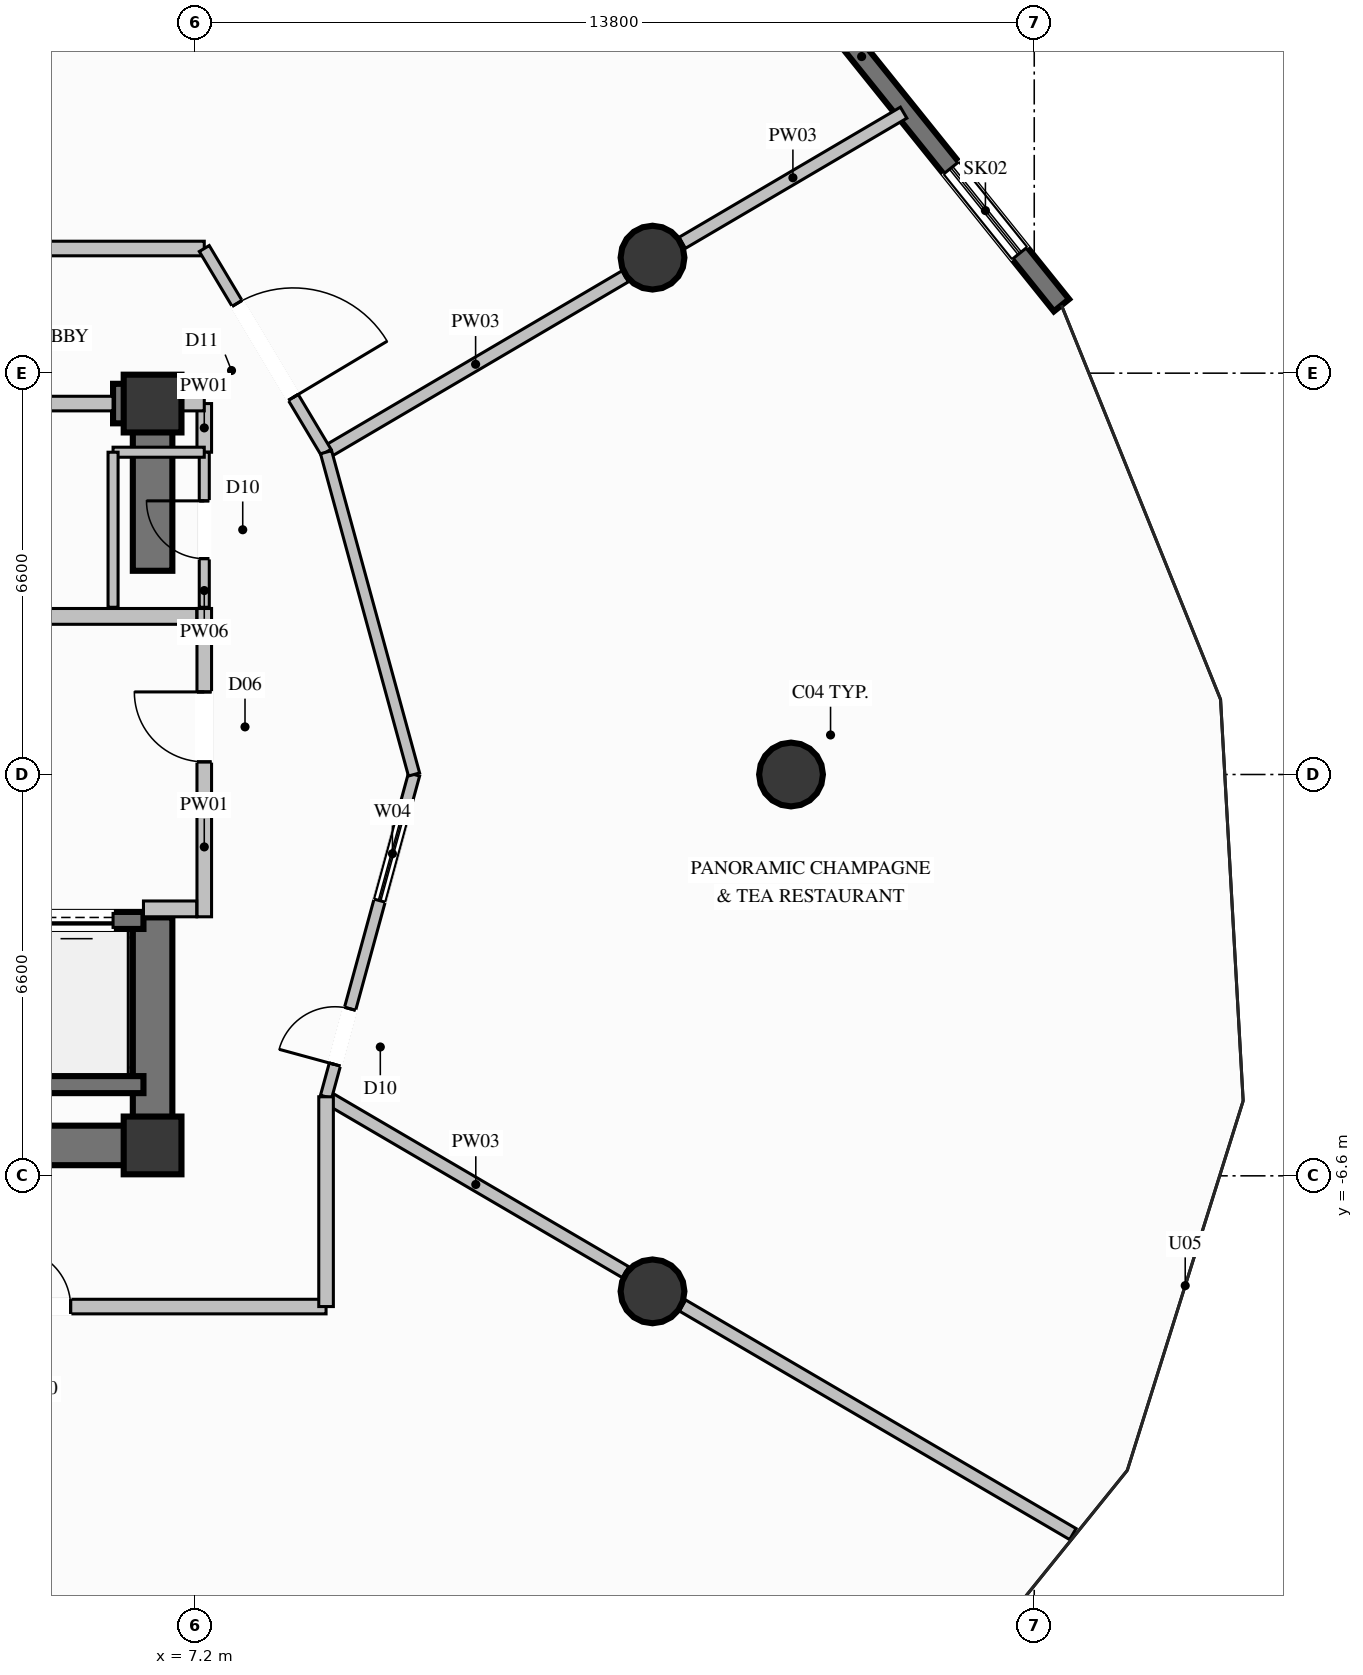
"""IFC4 building model, lengths in metres.
Left out: names, types, materials, properties, quantities, classifications, styles, units other than length and angle.
Written with IfcOpenShell. Run it as: python <this file> out.ifc"""

import sys

from ifc_helpers import new_model, si_unit, direction, frame, frame_2d, origin, origin_2d, place, context, subcontext, project, spatial, rectangle, circle, extrude, element, fill, save


model = new_model("IFC4")
c1 = context("Model", 3, precision=1e-05, world=origin(), true_north=direction((0.0, 1.0)))
c2 = subcontext(c1, "Body", "Model", "MODEL_VIEW")
j1 = project(units=[si_unit("LENGTHUNIT", "METRE"), si_unit("PLANEANGLEUNIT", "RADIAN")], contexts=[c1])
p1 = place(None, origin())
s1 = spatial("IfcSite", under=j1, at=p1, CompositionType="ELEMENT")
p2 = place(p1, origin())
s2 = spatial("IfcBuilding", under=s1, at=p2, CompositionType="ELEMENT")
p3 = place(p2, frame((0.0, 0.0, 98.0)))
s3 = spatial("IfcBuildingStorey", under=s2, at=p3, CompositionType="ELEMENT", Elevation=98.0)
for number, where, z_axis, x_axis in (
    (1, (6.5, -6.1, 0.0), (0.0, 0.0, 1.0), (1.0, 0.0, 0.0)),
    (2, (6.5, 6.1, 0.0), (0.0, 0.0, 1.0), (1.0, 0.0, 0.0)),
):
    element("IfcColumn", number, at=place(p3, frame(where, z_axis=z_axis, x_axis=x_axis)), inside=s3, PredefinedType="COLUMN", context=c2, shape_type="SweptSolid", body=[
        extrude(rectangle(XDim=0.95, YDim=0.95, at=origin_2d()), origin(), (0.0, 0.0, 1.0), 4.6),
    ])
p4 = place(p3, frame((4.15, -6.1, 0.0), z_axis=(0.0, 0.0, 1.0), x_axis=(1.0, 0.0, 0.0)))
e3 = element("IfcWall", 3, at=p4, inside=s3, PredefinedType="SHEAR", context=c2, shape_type="SweptSolid", body=[
    extrude(rectangle(XDim=2.025, YDim=0.65, at=frame_2d((1.013, 0.0))), origin(), (0.0, 0.0, 1.0), 4.6),
])
p5 = place(p3, frame((5.85, 6.1, 0.0), z_axis=(0.0, 0.0, 1.0), x_axis=(1.0, 0.0, 0.0)))
e4 = element("IfcWall", 4, at=p5, inside=s3, PredefinedType="SHEAR", context=c2, shape_type="SweptSolid", body=[
    extrude(rectangle(XDim=0.325, YDim=0.65, at=frame_2d((0.163, 0.0))), origin(), (0.0, 0.0, 1.0), 4.6),
])
p6 = place(p3, frame((6.5, -6.425, 0.0), z_axis=(0.0, 0.0, 1.0), x_axis=(0.0, 1.0, 0.0)))
e5 = element("IfcWall", 5, at=p6, inside=s3, PredefinedType="SHEAR", context=c2, shape_type="SweptSolid", body=[
    extrude(rectangle(XDim=4.075, YDim=0.65, at=frame_2d((2.038, 0.0))), origin(), (0.0, 0.0, 1.0), 4.6),
])
p7 = place(p3, frame((6.5, 3.35, 0.0), z_axis=(0.0, 0.0, 1.0), x_axis=(0.0, 1.0, 0.0)))
e6 = element("IfcWall", 6, at=p7, inside=s3, PredefinedType="SHEAR", context=c2, shape_type="SweptSolid", body=[
    extrude(rectangle(XDim=3.075, YDim=0.65, at=frame_2d((1.538, 0.0))), origin(), (0.0, 0.0, 1.0), 4.6),
])
for number, where, z_axis, x_axis in (
    (7, (17.0, 0.0, 0.0), (0.0, 0.0, 1.0), (1.0, 0.0, 0.0)),
    (8, (14.722, 8.5, 0.0), (0.0, 0.0, 1.0), (1.0, 0.0, 0.0)),
    (9, (14.722, -8.5, 0.0), (0.0, 0.0, 1.0), (1.0, 0.0, 0.0)),
):
    element("IfcColumn", number, at=place(p3, frame(where, z_axis=z_axis, x_axis=x_axis)), inside=s3, PredefinedType="COLUMN", context=c2, shape_type="SweptSolid", body=[
        extrude(circle(Radius=0.525, at=origin_2d()), origin(), (0.0, 0.0, 1.0), 4.6),
    ])
p8 = place(p3, frame((16.846, 13.443, 0.0), z_axis=(0.0, 0.0, 1.0), x_axis=(0.626452409109, -0.77945967126, 0.0)))
e10 = element("IfcWall", 10, at=p8, inside=s3, PredefinedType="SOLIDWALL", context=c2, shape_type="SweptSolid", body=[
    extrude(rectangle(XDim=7.346, YDim=0.32, at=frame_2d((3.673, 0.0))), origin(), (0.0, 0.0, 1.0), 4.35),
])
p9 = place(p8, frame((4.449, 0.0, 0.6)))
e11 = element("IfcOpeningElement", 11, at=p9, cuts=e10, PredefinedType="OPENING", context=c2, shape_type="SweptSolid", body=[
    extrude(rectangle(XDim=1.8, YDim=2.2, at=frame_2d((0.9, 1.1))), frame((0.0, 0.17, 0.0), z_axis=(0.0, -1.0, 0.0), x_axis=(1.0, 0.0, 0.0)), (0.0, 0.0, 1.0), 0.34),
])
p10 = place(p3, frame((4.15, -5.1, 0.0), z_axis=(0.0, 0.0, 1.0), x_axis=(1.0, 0.0, 0.0)))
e12 = element("IfcWall", 12, at=p10, inside=s3, PredefinedType="SOLIDWALL", context=c2, shape_type="SweptSolid", body=[
    extrude(rectangle(XDim=2.2, YDim=0.28, at=frame_2d((1.1, 0.0))), origin(), (0.0, 0.0, 1.0), 4.35),
])
p11 = place(p3, frame((6.35, -2.4, 0.0), z_axis=(0.0, 0.0, 1.0), x_axis=(-1.0, 0.0, 0.0)))
e13 = element("IfcWall", 13, at=p11, inside=s3, PredefinedType="SOLIDWALL", context=c2, shape_type="SweptSolid", body=[
    extrude(rectangle(XDim=2.2, YDim=0.28, at=frame_2d((1.1, 0.0))), origin(), (0.0, 0.0, 1.0), 4.35),
])
p12 = place(p11, frame((0.5, 0.0, 0.0)))
e14 = element("IfcOpeningElement", 14, at=p12, cuts=e13, PredefinedType="OPENING", context=c2, shape_type="SweptSolid", body=[
    extrude(rectangle(XDim=1.2, YDim=2.2, at=frame_2d((0.6, 1.1))), frame((0.0, 0.15, 0.0), z_axis=(0.0, -1.0, 0.0), x_axis=(1.0, 0.0, 0.0)), (0.0, 0.0, 1.0), 0.3),
])
p13 = place(p3, frame((7.35, -2.34, 0.0), z_axis=(0.0, 0.0, 1.0), x_axis=(0.0, 1.0, 0.0)))
e15 = element("IfcWall", 15, at=p13, inside=s3, PredefinedType="PARTITIONING", context=c2, shape_type="SweptSolid", body=[
    extrude(rectangle(XDim=5.07, YDim=0.24, at=frame_2d((2.535, 0.0))), origin(), (0.0, 0.0, 1.0), 3.235),
])
p14 = place(p13, frame((2.548, 0.0, 0.0)))
e16 = element("IfcOpeningElement", 16, at=p14, cuts=e15, PredefinedType="OPENING", context=c2, shape_type="SweptSolid", body=[
    extrude(rectangle(XDim=1.15, YDim=2.2, at=frame_2d((0.575, 1.1))), frame((0.0, 0.13, 0.0), z_axis=(0.0, -1.0, 0.0), x_axis=(1.0, 0.0, 0.0)), (0.0, 0.0, 1.0), 0.26),
])
p15 = place(p3, frame((6.35, -2.21, 0.0), z_axis=(0.0, 0.0, 1.0), x_axis=(1.0, 0.0, 0.0)))
e17 = element("IfcWall", 17, at=p15, inside=s3, PredefinedType="PARTITIONING", context=c2, shape_type="SweptSolid", body=[
    extrude(rectangle(XDim=0.875, YDim=0.26, at=frame_2d((0.438, 0.0))), origin(), (0.0, 0.0, 1.0), 4.35),
])
p16 = place(p3, frame((4.13, 2.6, 0.0), z_axis=(0.0, 0.0, 1.0), x_axis=(1.0, 0.0, 0.0)))
e18 = element("IfcWall", 18, at=p16, inside=s3, PredefinedType="PARTITIONING", context=c2, shape_type="SweptSolid", body=[
    extrude(rectangle(XDim=3.095, YDim=0.26, at=frame_2d((1.548, 0.0))), origin(), (0.0, 0.0, 1.0), 4.35),
])
p17 = place(p3, frame((-7.35, 8.65, 0.0), z_axis=(0.0, 0.0, 1.0), x_axis=(1.0, 0.0, 0.0)))
e19 = element("IfcWall", 19, at=p17, inside=s3, PredefinedType="PARTITIONING", context=c2, shape_type="SweptSolid", body=[
    extrude(rectangle(XDim=14.7, YDim=0.24, at=frame_2d((7.35, 0.0))), origin(), (0.0, 0.0, 1.0), 4.35),
])
p18 = place(p3, frame((3.0, 6.1, 0.0), z_axis=(0.0, 0.0, 1.0), x_axis=(1.0, 0.0, 0.0)))
e20 = element("IfcWall", 20, at=p18, inside=s3, PredefinedType="PARTITIONING", context=c2, shape_type="SweptSolid", body=[
    extrude(rectangle(XDim=2.85, YDim=0.24, at=frame_2d((1.425, 0.0))), origin(), (0.0, 0.0, 1.0), 3.235),
])
p19 = place(p3, frame((7.35, 5.3, 0.0), z_axis=(0.0, 0.0, 1.0), x_axis=(0.0, 1.0, 0.0)))
e21 = element("IfcWall", 21, at=p19, inside=s3, PredefinedType="PARTITIONING", context=c2, shape_type="SweptSolid", body=[
    extrude(rectangle(XDim=0.8, YDim=0.24, at=frame_2d((0.4, 0.0))), origin(), (0.0, 0.0, 1.0), 3.235),
])
p20 = place(p3, frame((6.5, 6.1, 0.0), z_axis=(0.0, 0.0, 1.0), x_axis=(1.0, 0.0, 0.0)))
e22 = element("IfcWall", 22, at=p20, inside=s3, PredefinedType="PARTITIONING", context=c2, shape_type="SweptSolid", body=[
    extrude(rectangle(XDim=0.85, YDim=0.24, at=frame_2d((0.425, 0.0))), origin(), (0.0, 0.0, 1.0), 3.718),
])
p21 = place(p3, frame((7.35, 2.75, 0.0), z_axis=(0.0, 0.0, 1.0), x_axis=(0.0, 1.0, 0.0)))
e23 = element("IfcWall", 23, at=p21, inside=s3, PredefinedType="PARTITIONING", context=c2, shape_type="SweptSolid", body=[
    extrude(rectangle(XDim=2.55, YDim=0.165, at=frame_2d((1.275, 0.0))), origin(), (0.0, 0.0, 1.0), 3.235),
])
p22 = place(p21, frame((0.8, 0.0, 0.0)))
e24 = element("IfcOpeningElement", 24, at=p22, cuts=e23, PredefinedType="OPENING", context=c2, shape_type="SweptSolid", body=[
    extrude(rectangle(XDim=0.95, YDim=2.1, at=frame_2d((0.475, 1.05))), frame((0.0, 0.093, 0.0), z_axis=(0.0, -1.0, 0.0), x_axis=(1.0, 0.0, 0.0)), (0.0, 0.0, 1.0), 0.185),
])
p23 = place(p3, frame((7.35, 5.3, 0.0), z_axis=(0.0, 0.0, 1.0), x_axis=(-1.0, 0.0, 0.0)))
e25 = element("IfcWall", 25, at=p23, inside=s3, PredefinedType="PARTITIONING", context=c2, shape_type="SweptSolid", body=[
    extrude(rectangle(XDim=1.5, YDim=0.165, at=frame_2d((0.75, 0.0))), origin(), (0.0, 0.0, 1.0), 3.235),
])
p24 = place(p3, frame((5.85, 5.3, 0.0), z_axis=(0.0, 0.0, 1.0), x_axis=(0.0, -1.0, 0.0)))
e26 = element("IfcWall", 26, at=p24, inside=s3, PredefinedType="PARTITIONING", context=c2, shape_type="SweptSolid", body=[
    extrude(rectangle(XDim=2.55, YDim=0.165, at=frame_2d((1.275, 0.0))), origin(), (0.0, 0.0, 1.0), 3.235),
])
p25 = place(p3, frame((9.353, 5.3, 0.0), z_axis=(0.0, 0.0, 1.0), x_axis=(0.862060677735, 0.506805078805, 0.0)))
e27 = element("IfcWall", 27, at=p25, inside=s3, PredefinedType="PARTITIONING", context=c2, shape_type="SweptSolid", body=[
    extrude(rectangle(XDim=5.706, YDim=0.21, at=frame_2d((2.853, 0.0))), origin(), (0.0, 0.0, 1.0), 3.718),
])
p26 = place(p3, frame((15.21, 8.743, 0.0), z_axis=(0.0, 0.0, 1.0), x_axis=(0.86206788284, 0.506792822932, 0.0)))
e28 = element("IfcWall", 28, at=p26, inside=s3, PredefinedType="PARTITIONING", context=c2, shape_type="SweptSolid", body=[
    extrude(rectangle(XDim=4.225, YDim=0.21, at=frame_2d((2.112, 0.0))), origin(), (0.0, 0.0, 1.0), 4.35),
])
p27 = place(p3, frame((9.353, -5.3, 0.0), z_axis=(0.0, 0.0, 1.0), x_axis=(0.862932126693, -0.505319843981, 0.0)))
e29 = element("IfcWall", 29, at=p27, inside=s3, PredefinedType="PARTITIONING", context=c2, shape_type="SweptSolid", body=[
    extrude(rectangle(XDim=5.707, YDim=0.21, at=frame_2d((2.854, 0.0))), origin(), (0.0, 0.0, 1.0), 3.718),
])
p28 = place(p3, frame((15.215, -8.732, 0.0), z_axis=(0.0, 0.0, 1.0), x_axis=(0.862954092822, -0.505282330665, 0.0)))
e30 = element("IfcWall", 30, at=p28, inside=s3, PredefinedType="PARTITIONING", context=c2, shape_type="SweptSolid", body=[
    extrude(rectangle(XDim=7.439, YDim=0.21, at=frame_2d((3.72, 0.0))), origin(), (0.0, 0.0, 1.0), 4.35),
])
p29 = place(p3, frame((7.35, 8.65, 0.0), z_axis=(0.0, 0.0, 1.0), x_axis=(0.513179710324, -0.858281180565, 0.0)))
e31 = element("IfcWall", 31, at=p29, inside=s3, PredefinedType="PARTITIONING", context=c2, shape_type="SweptSolid", body=[
    extrude(rectangle(XDim=3.903, YDim=0.19, at=frame_2d((1.952, 0.0))), origin(), (0.0, 0.0, 1.0), 4.35),
])
p30 = place(p29, frame((1.052, 0.0, 0.0)))
e32 = element("IfcOpeningElement", 32, at=p30, cuts=e31, PredefinedType="OPENING", context=c2, shape_type="SweptSolid", body=[
    extrude(rectangle(XDim=1.8, YDim=2.4, at=frame_2d((0.9, 1.2))), frame((0.0, 0.105, 0.0), z_axis=(0.0, -1.0, 0.0), x_axis=(1.0, 0.0, 0.0)), (0.0, 0.0, 1.0), 0.21),
])
p31 = place(p3, frame((9.353, -5.3, 0.0), z_axis=(0.0, 0.0, 1.0), x_axis=(0.263380602271, 0.964692001805, 0.0)))
e33 = element("IfcWall", 33, at=p31, inside=s3, PredefinedType="PARTITIONING", context=c2, shape_type="SweptSolid", body=[
    extrude(rectangle(XDim=5.494, YDim=0.19, at=frame_2d((2.747, 0.0))), origin(), (0.0, 0.0, 1.0), 4.35),
])
p32 = place(p31, frame((0.55, 0.0, 0.0)))
e34 = element("IfcOpeningElement", 34, at=p32, cuts=e33, PredefinedType="OPENING", context=c2, shape_type="SweptSolid", body=[
    extrude(rectangle(XDim=0.95, YDim=2.1, at=frame_2d((0.475, 1.05))), frame((0.0, 0.105, 0.0), z_axis=(0.0, -1.0, 0.0), x_axis=(1.0, 0.0, 0.0)), (0.0, 0.0, 1.0), 0.21),
])
p33 = place(p31, frame((3.344, 0.0, 0.9)))
e35 = element("IfcOpeningElement", 35, at=p33, cuts=e33, PredefinedType="OPENING", context=c2, shape_type="SweptSolid", body=[
    extrude(rectangle(XDim=1.6, YDim=1.4, at=frame_2d((0.8, 0.7))), frame((0.0, 0.105, 0.0), z_axis=(0.0, -1.0, 0.0), x_axis=(1.0, 0.0, 0.0)), (0.0, 0.0, 1.0), 0.21),
])
p34 = place(p3, frame((10.8, 0.0, 0.0), z_axis=(0.0, 0.0, 1.0), x_axis=(-0.263380602271, 0.964692001805, 0.0)))
e36 = element("IfcWall", 36, at=p34, inside=s3, PredefinedType="PARTITIONING", context=c2, shape_type="SweptSolid", body=[
    extrude(rectangle(XDim=5.494, YDim=0.19, at=frame_2d((2.747, 0.0))), origin(), (0.0, 0.0, 1.0), 4.35),
])
p35 = place(p3, frame((0.0, -8.75, 0.0), z_axis=(0.0, 0.0, 1.0), x_axis=(1.0, 0.0, 0.0)))
e37 = element("IfcWall", 37, at=p35, inside=s3, PredefinedType="PARTITIONING", context=c2, shape_type="SweptSolid", body=[
    extrude(rectangle(XDim=9.353, YDim=0.24, at=frame_2d((4.677, 0.0))), origin(), (0.0, 0.0, 1.0), 4.35),
])
p36 = place(p35, frame((4.202, 0.0, 0.0)))
e38 = element("IfcOpeningElement", 38, at=p36, cuts=e37, PredefinedType="OPENING", context=c2, shape_type="SweptSolid", body=[
    extrude(rectangle(XDim=0.95, YDim=2.1, at=frame_2d((0.475, 1.05))), frame((0.0, 0.13, 0.0), z_axis=(0.0, -1.0, 0.0), x_axis=(1.0, 0.0, 0.0)), (0.0, 0.0, 1.0), 0.26),
])
p37 = place(p3, frame((9.353, -8.75, 0.0), z_axis=(0.0, 0.0, 1.0), x_axis=(0.0, 1.0, 0.0)))
e39 = element("IfcWall", 39, at=p37, inside=s3, PredefinedType="PARTITIONING", context=c2, shape_type="SweptSolid", body=[
    extrude(rectangle(XDim=3.45, YDim=0.24, at=frame_2d((1.725, 0.0))), origin(), (0.0, 0.0, 1.0), 4.35),
])
p38 = place(p9, origin())
e40 = element("IfcWindow", 40, at=p38, inside=s3, PartitioningType="SINGLE_PANEL", PredefinedType="SKYLIGHT", context=c2, shape_type="SweptSolid", body=[
    extrude(rectangle(XDim=1.8, YDim=2.2, at=frame_2d((0.9, 1.1))), frame((0.0, 0.03, 0.0), z_axis=(0.0, -1.0, 0.0), x_axis=(1.0, 0.0, 0.0)), (0.0, 0.0, 1.0), 0.06),
])
fill(e11, e40)
p39 = place(p12, origin())
e41 = element("IfcDoor", 41, at=p39, inside=s3, OperationType="SLIDING_TO_LEFT", PredefinedType="DOOR", context=c2, shape_type="SweptSolid", body=[
    extrude(rectangle(XDim=1.2, YDim=2.2, at=frame_2d((0.6, 1.1))), frame((0.0, 0.025, 0.0), z_axis=(0.0, -1.0, 0.0), x_axis=(1.0, 0.0, 0.0)), (0.0, 0.0, 1.0), 0.05),
])
fill(e14, e41)
p40 = place(p14, origin())
e42 = element("IfcDoor", 42, at=p40, inside=s3, OperationType="SINGLE_SWING_RIGHT", PredefinedType="DOOR", context=c2, shape_type="SweptSolid", body=[
    extrude(rectangle(XDim=1.15, YDim=2.2, at=frame_2d((0.575, 1.1))), frame((0.0, 0.025, 0.0), z_axis=(0.0, -1.0, 0.0), x_axis=(1.0, 0.0, 0.0)), (0.0, 0.0, 1.0), 0.05),
])
fill(e16, e42)
p41 = place(p22, origin())
e43 = element("IfcDoor", 43, at=p41, inside=s3, OperationType="SINGLE_SWING_RIGHT", PredefinedType="DOOR", context=c2, shape_type="SweptSolid", body=[
    extrude(rectangle(XDim=0.95, YDim=2.1, at=frame_2d((0.475, 1.05))), frame((0.0, 0.025, 0.0), z_axis=(0.0, -1.0, 0.0), x_axis=(1.0, 0.0, 0.0)), (0.0, 0.0, 1.0), 0.05),
])
fill(e24, e43)
p42 = place(p30, origin())
e44 = element("IfcDoor", 44, at=p42, inside=s3, OperationType="SINGLE_SWING_RIGHT", PredefinedType="DOOR", context=c2, shape_type="SweptSolid", body=[
    extrude(rectangle(XDim=1.8, YDim=2.4, at=frame_2d((0.9, 1.2))), frame((0.0, 0.025, 0.0), z_axis=(0.0, -1.0, 0.0), x_axis=(1.0, 0.0, 0.0)), (0.0, 0.0, 1.0), 0.05),
])
fill(e32, e44)
p43 = place(p32, origin())
e45 = element("IfcDoor", 45, at=p43, inside=s3, OperationType="SINGLE_SWING_LEFT", PredefinedType="DOOR", context=c2, shape_type="SweptSolid", body=[
    extrude(rectangle(XDim=0.95, YDim=2.1, at=frame_2d((0.475, 1.05))), frame((0.0, 0.025, 0.0), z_axis=(0.0, -1.0, 0.0), x_axis=(1.0, 0.0, 0.0)), (0.0, 0.0, 1.0), 0.05),
])
fill(e34, e45)
p44 = place(p33, origin())
e46 = element("IfcWindow", 46, at=p44, inside=s3, PartitioningType="SINGLE_PANEL", PredefinedType="WINDOW", context=c2, shape_type="SweptSolid", body=[
    extrude(rectangle(XDim=1.6, YDim=1.4, at=frame_2d((0.8, 0.7))), frame((0.0, 0.03, 0.0), z_axis=(0.0, -1.0, 0.0), x_axis=(1.0, 0.0, 0.0)), (0.0, 0.0, 1.0), 0.06),
])
fill(e35, e46)
p45 = place(p36, origin())
e47 = element("IfcDoor", 47, at=p45, inside=s3, OperationType="SINGLE_SWING_LEFT", PredefinedType="DOOR", context=c2, shape_type="SweptSolid", body=[
    extrude(rectangle(XDim=0.95, YDim=2.1, at=frame_2d((0.475, 1.05))), frame((0.0, 0.025, 0.0), z_axis=(0.0, -1.0, 0.0), x_axis=(1.0, 0.0, 0.0)), (0.0, 0.0, 1.0), 0.05),
])
fill(e38, e47)
save(model, sys.argv[1])
